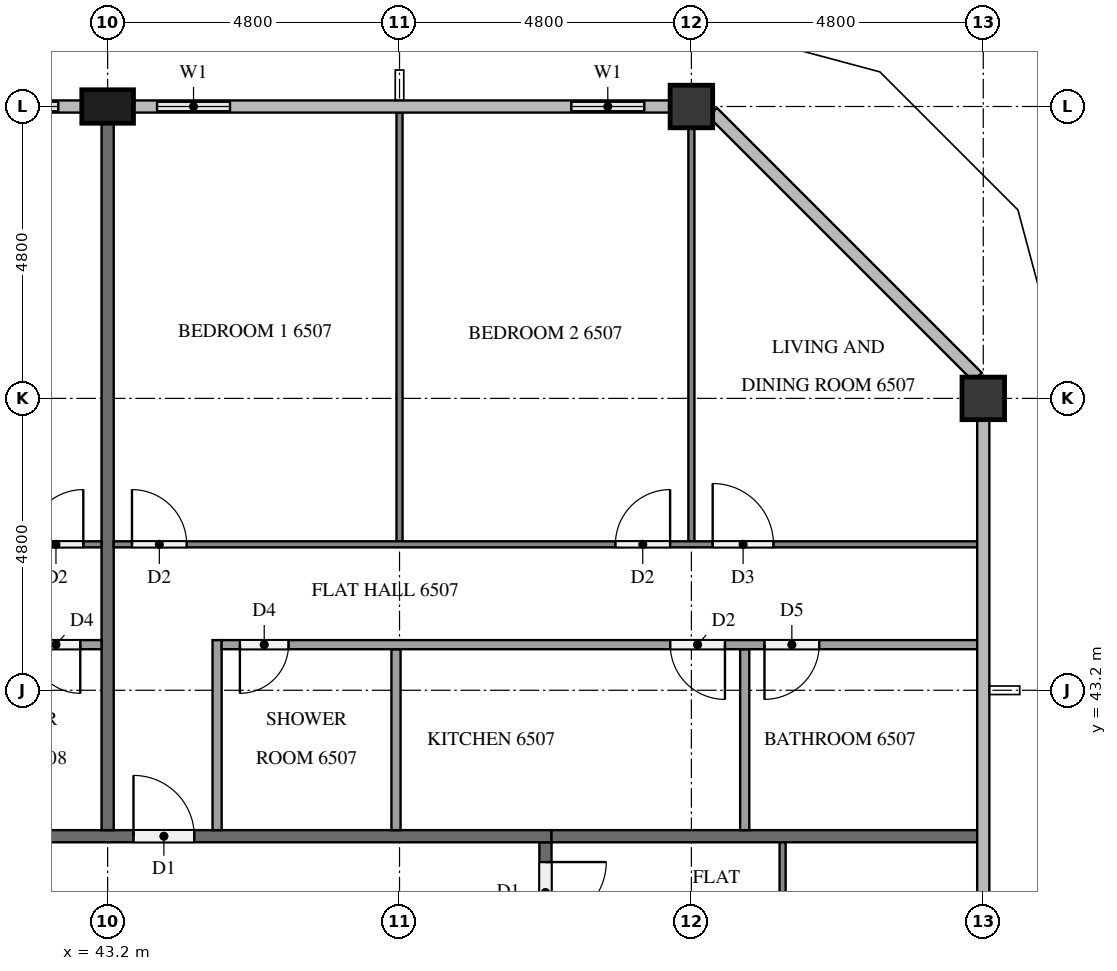
"""IFC4 building model, lengths in metres.
Left out: names, types, materials, properties, quantities, classifications, styles, units other than length and angle.
Written with IfcOpenShell. Run it as: python <this file> out.ifc"""

import sys

from ifc_helpers import new_model, si_unit, direction, frame, frame_2d, origin, origin_2d, place, context, subcontext, project, spatial, rectangle, extrude, element, fill, save


model = new_model("IFC4")
c1 = context("Model", 3, precision=1e-05, world=origin(), true_north=direction((0.0, 1.0)))
c2 = subcontext(c1, "Body", "Model", "MODEL_VIEW")
j1 = project(units=[si_unit("LENGTHUNIT", "METRE"), si_unit("PLANEANGLEUNIT", "RADIAN")], contexts=[c1])
p1 = place(None, origin())
s1 = spatial("IfcSite", under=j1, at=p1, CompositionType="ELEMENT")
p2 = place(p1, origin())
s2 = spatial("IfcBuilding", under=s1, at=p2, CompositionType="ELEMENT")
p3 = place(p2, frame((0.0, 0.0, 249.2)))
s3 = spatial("IfcBuildingStorey", under=s2, at=p3, CompositionType="ELEMENT", Elevation=249.2)
for number, where, z_axis, x_axis in (
    (1, (57.6, 48.0, 0.0), (0.0, 0.0, 1.0), (1.0, 0.0, 0.0)),
    (2, (52.8, 52.8, 0.0), (0.0, 0.0, 1.0), (1.0, 0.0, 0.0)),
):
    element("IfcColumn", number, at=place(p3, frame(where, z_axis=z_axis, x_axis=x_axis)), inside=s3, PredefinedType="COLUMN", context=c2, shape_type="SweptSolid", body=[
        extrude(rectangle(XDim=0.7, YDim=0.7, at=origin_2d()), origin(), (0.0, 0.0, 1.0), 3.2),
    ])
p4 = place(p3, frame((43.2, 52.8, 0.0), z_axis=(0.0, 0.0, 1.0), x_axis=(1.0, 0.0, 0.0)))
e3 = element("IfcColumn", 3, at=p4, inside=s3, PredefinedType="COLUMN", context=c2, shape_type="SweptSolid", body=[
    extrude(rectangle(XDim=0.85, YDim=0.55, at=origin_2d()), origin(), (0.0, 0.0, 1.0), 3.2),
])
p5 = place(p3, frame((52.45, 52.8, 0.0), z_axis=(0.0, 0.0, 1.0), x_axis=(-1.0, 0.0, 0.0)))
e4 = element("IfcWall", 4, at=p5, inside=s3, PredefinedType="SOLIDWALL", context=c2, shape_type="SweptSolid", body=[
    extrude(rectangle(XDim=2.05, YDim=0.15, at=frame_2d((1.025, 0.0))), origin(), (0.0, 0.0, 1.0), 3.2),
])
p6 = place(p5, frame((0.425, 0.0, 0.9)))
e5 = element("IfcOpeningElement", 5, at=p6, cuts=e4, PredefinedType="OPENING", context=c2, shape_type="SweptSolid", body=[
    extrude(rectangle(XDim=1.2, YDim=1.4, at=frame_2d((0.6, 0.7))), frame((0.0, 0.085, 0.0), z_axis=(0.0, -1.0, 0.0), x_axis=(1.0, 0.0, 0.0)), (0.0, 0.0, 1.0), 0.17),
])
p7 = place(p3, frame((45.6, 52.8, 0.0), z_axis=(0.0, 0.0, 1.0), x_axis=(-1.0, 0.0, 0.0)))
e6 = element("IfcWall", 6, at=p7, inside=s3, PredefinedType="SOLIDWALL", context=c2, shape_type="SweptSolid", body=[
    extrude(rectangle(XDim=1.975, YDim=0.15, at=frame_2d((0.988, 0.0))), origin(), (0.0, 0.0, 1.0), 3.2),
])
p8 = place(p7, frame((0.387, 0.0, 0.9)))
e7 = element("IfcOpeningElement", 7, at=p8, cuts=e6, PredefinedType="OPENING", context=c2, shape_type="SweptSolid", body=[
    extrude(rectangle(XDim=1.2, YDim=1.4, at=frame_2d((0.6, 0.7))), frame((0.0, 0.085, 0.0), z_axis=(0.0, -1.0, 0.0), x_axis=(1.0, 0.0, 0.0)), (0.0, 0.0, 1.0), 0.17),
])
p9 = place(p3, frame((42.775, 52.8, 0.0), z_axis=(0.0, 0.0, 1.0), x_axis=(-1.0, 0.0, 0.0)))
e8 = element("IfcWall", 8, at=p9, inside=s3, PredefinedType="SOLIDWALL", context=c2, shape_type="SweptSolid", body=[
    extrude(rectangle(XDim=1.975, YDim=0.15, at=frame_2d((0.987, 0.0))), origin(), (0.0, 0.0, 1.0), 3.2),
])
p10 = place(p9, frame((0.387, 0.0, 0.9)))
e9 = element("IfcOpeningElement", 9, at=p10, cuts=e8, PredefinedType="OPENING", context=c2, shape_type="SweptSolid", body=[
    extrude(rectangle(XDim=1.2, YDim=1.4, at=frame_2d((0.6, 0.7))), frame((0.0, 0.085, 0.0), z_axis=(0.0, -1.0, 0.0), x_axis=(1.0, 0.0, 0.0)), (0.0, 0.0, 1.0), 0.17),
])
p11 = place(p3, frame((50.4, 40.7, 0.0), z_axis=(0.0, 0.0, 1.0), x_axis=(0.0, -1.0, 0.0)))
e10 = element("IfcWall", 10, at=p11, inside=s3, PredefinedType="PARTITIONING", context=c2, shape_type="SweptSolid", body=[
    extrude(rectangle(XDim=28.6, YDim=0.2, at=frame_2d((14.3, 0.0))), origin(), (0.0, 0.0, 1.0), 3.2),
])
p12 = place(p11, frame((19.525, 0.0, 0.0)))
e11 = element("IfcOpeningElement", 11, at=p12, cuts=e10, PredefinedType="OPENING", context=c2, shape_type="SweptSolid", body=[
    extrude(rectangle(XDim=1.0, YDim=2.1, at=frame_2d((0.5, 1.05))), frame((0.0, 0.11, 0.0), z_axis=(0.0, -1.0, 0.0), x_axis=(1.0, 0.0, 0.0)), (0.0, 0.0, 1.0), 0.22),
])
p13 = place(p11, frame((17.675, 0.0, 0.0)))
e12 = element("IfcOpeningElement", 12, at=p13, cuts=e10, PredefinedType="OPENING", context=c2, shape_type="SweptSolid", body=[
    extrude(rectangle(XDim=1.0, YDim=2.1, at=frame_2d((0.5, 1.05))), frame((0.0, 0.11, 0.0), z_axis=(0.0, -1.0, 0.0), x_axis=(1.0, 0.0, 0.0)), (0.0, 0.0, 1.0), 0.22),
])
p14 = place(p11, frame((0.325, 0.0, 0.0)))
e13 = element("IfcOpeningElement", 13, at=p14, cuts=e10, PredefinedType="OPENING", context=c2, shape_type="SweptSolid", body=[
    extrude(rectangle(XDim=1.0, YDim=2.1, at=frame_2d((0.5, 1.05))), frame((0.0, 0.11, 0.0), z_axis=(0.0, -1.0, 0.0), x_axis=(1.0, 0.0, 0.0)), (0.0, 0.0, 1.0), 0.22),
])
p15 = place(p3, frame((11.9, 40.8, 0.0), z_axis=(0.0, 0.0, 1.0), x_axis=(1.0, 0.0, 0.0)))
e14 = element("IfcWall", 14, at=p15, inside=s3, PredefinedType="PARTITIONING", context=c2, shape_type="SweptSolid", body=[
    extrude(rectangle(XDim=38.6, YDim=0.2, at=frame_2d((19.3, 0.0))), origin(), (0.0, 0.0, 1.0), 3.2),
])
p16 = place(p15, frame((31.725, 0.0, 0.0)))
e15 = element("IfcOpeningElement", 15, at=p16, cuts=e14, PredefinedType="OPENING", context=c2, shape_type="SweptSolid", body=[
    extrude(rectangle(XDim=1.0, YDim=2.1, at=frame_2d((0.5, 1.05))), frame((0.0, 0.11, 0.0), z_axis=(0.0, -1.0, 0.0), x_axis=(1.0, 0.0, 0.0)), (0.0, 0.0, 1.0), 0.22),
])
p17 = place(p15, frame((17.325, 0.0, 0.0)))
e16 = element("IfcOpeningElement", 16, at=p17, cuts=e14, PredefinedType="OPENING", context=c2, shape_type="SweptSolid", body=[
    extrude(rectangle(XDim=1.0, YDim=2.1, at=frame_2d((0.5, 1.05))), frame((0.0, 0.11, 0.0), z_axis=(0.0, -1.0, 0.0), x_axis=(1.0, 0.0, 0.0)), (0.0, 0.0, 1.0), 0.22),
])
p18 = place(p15, frame((0.525, 0.0, 0.0)))
e17 = element("IfcOpeningElement", 17, at=p18, cuts=e14, PredefinedType="OPENING", context=c2, shape_type="SweptSolid", body=[
    extrude(rectangle(XDim=1.0, YDim=2.1, at=frame_2d((0.5, 1.05))), frame((0.0, 0.11, 0.0), z_axis=(0.0, -1.0, 0.0), x_axis=(1.0, 0.0, 0.0)), (0.0, 0.0, 1.0), 0.22),
])
p19 = place(p3, frame((50.5, 40.8, 0.0), z_axis=(0.0, 0.0, 1.0), x_axis=(1.0, 0.0, 0.0)))
e18 = element("IfcWall", 18, at=p19, inside=s3, PredefinedType="PARTITIONING", context=c2, shape_type="SweptSolid", body=[
    extrude(rectangle(XDim=7.0, YDim=0.2, at=frame_2d((3.5, 0.0))), origin(), (0.0, 0.0, 1.0), 3.2),
])
p20 = place(p3, frame((43.2, 52.525, 0.0), z_axis=(0.0, 0.0, 1.0), x_axis=(0.0, -1.0, 0.0)))
e19 = element("IfcWall", 19, at=p20, inside=s3, PredefinedType="PARTITIONING", context=c2, shape_type="SweptSolid", body=[
    extrude(rectangle(XDim=11.625, YDim=0.2, at=frame_2d((5.812, 0.0))), origin(), (0.0, 0.0, 1.0), 3.2),
])
p21 = place(p3, frame((54.3, 40.7, 0.0), z_axis=(0.0, 0.0, 1.0), x_axis=(0.0, -1.0, 0.0)))
e20 = element("IfcWall", 20, at=p21, inside=s3, PredefinedType="PARTITIONING", context=c2, shape_type="SweptSolid", body=[
    extrude(rectangle(XDim=9.4, YDim=0.1, at=frame_2d((4.7, 0.0))), origin(), (0.0, 0.0, 1.0), 3.2),
])
p22 = place(p21, frame((3.45, 0.0, 0.0)))
e21 = element("IfcOpeningElement", 21, at=p22, cuts=e20, PredefinedType="OPENING", context=c2, shape_type="SweptSolid", body=[
    extrude(rectangle(XDim=0.9, YDim=2.1, at=frame_2d((0.45, 1.05))), frame((0.0, 0.06, 0.0), z_axis=(0.0, -1.0, 0.0), x_axis=(1.0, 0.0, 0.0)), (0.0, 0.0, 1.0), 0.12),
])
p23 = place(p21, frame((5.05, 0.0, 0.0)))
e22 = element("IfcOpeningElement", 22, at=p23, cuts=e20, PredefinedType="OPENING", context=c2, shape_type="SweptSolid", body=[
    extrude(rectangle(XDim=1.0, YDim=2.1, at=frame_2d((0.5, 1.05))), frame((0.0, 0.06, 0.0), z_axis=(0.0, -1.0, 0.0), x_axis=(1.0, 0.0, 0.0)), (0.0, 0.0, 1.0), 0.12),
])
p24 = place(p3, frame((48.0, 45.65, 0.0), z_axis=(0.0, 0.0, 1.0), x_axis=(0.0, 1.0, 0.0)))
e23 = element("IfcWall", 23, at=p24, inside=s3, PredefinedType="PARTITIONING", context=c2, shape_type="SweptSolid", body=[
    extrude(rectangle(XDim=7.05, YDim=0.1, at=frame_2d((3.525, 0.0))), origin(), (0.0, 0.0, 1.0), 3.2),
])
p25 = place(p3, frame((52.8, 45.65, 0.0), z_axis=(0.0, 0.0, 1.0), x_axis=(0.0, 1.0, 0.0)))
e24 = element("IfcWall", 24, at=p25, inside=s3, PredefinedType="PARTITIONING", context=c2, shape_type="SweptSolid", body=[
    extrude(rectangle(XDim=6.8, YDim=0.1, at=frame_2d((3.4, 0.0))), origin(), (0.0, 0.0, 1.0), 3.2),
])
p26 = place(p3, frame((43.3, 45.6, 0.0), z_axis=(0.0, 0.0, 1.0), x_axis=(1.0, 0.0, 0.0)))
e25 = element("IfcWall", 25, at=p26, inside=s3, PredefinedType="PARTITIONING", context=c2, shape_type="SweptSolid", body=[
    extrude(rectangle(XDim=14.2, YDim=0.1, at=frame_2d((7.1, 0.0))), origin(), (0.0, 0.0, 1.0), 3.2),
])
p27 = place(p26, frame((0.3, 0.0, 0.0)))
e26 = element("IfcOpeningElement", 26, at=p27, cuts=e25, PredefinedType="OPENING", context=c2, shape_type="SweptSolid", body=[
    extrude(rectangle(XDim=0.9, YDim=2.1, at=frame_2d((0.45, 1.05))), frame((0.0, 0.06, 0.0), z_axis=(0.0, -1.0, 0.0), x_axis=(1.0, 0.0, 0.0)), (0.0, 0.0, 1.0), 0.12),
])
p28 = place(p26, frame((8.25, 0.0, 0.0)))
e27 = element("IfcOpeningElement", 27, at=p28, cuts=e25, PredefinedType="OPENING", context=c2, shape_type="SweptSolid", body=[
    extrude(rectangle(XDim=0.9, YDim=2.1, at=frame_2d((0.45, 1.05))), frame((0.0, 0.06, 0.0), z_axis=(0.0, -1.0, 0.0), x_axis=(1.0, 0.0, 0.0)), (0.0, 0.0, 1.0), 0.12),
])
p29 = place(p26, frame((9.85, 0.0, 0.0)))
e28 = element("IfcOpeningElement", 28, at=p29, cuts=e25, PredefinedType="OPENING", context=c2, shape_type="SweptSolid", body=[
    extrude(rectangle(XDim=1.0, YDim=2.1, at=frame_2d((0.5, 1.05))), frame((0.0, 0.06, 0.0), z_axis=(0.0, -1.0, 0.0), x_axis=(1.0, 0.0, 0.0)), (0.0, 0.0, 1.0), 0.12),
])
for number, where, z_axis, x_axis in (
    (29, (47.942, 40.9, 0.0), (0.0, 0.0, 1.0), (0.0, 1.0, 0.0)),
    (30, (53.677, 40.9, 0.0), (0.0, 0.0, 1.0), (0.0, 1.0, 0.0)),
):
    element("IfcWall", number, at=place(p3, frame(where, z_axis=z_axis, x_axis=x_axis)), inside=s3, PredefinedType="PARTITIONING", context=c2, shape_type="SweptSolid", body=[
        extrude(rectangle(XDim=2.975, YDim=0.15, at=frame_2d((1.488, 0.0))), origin(), (0.0, 0.0, 1.0), 3.2),
    ])
p30 = place(p3, frame((45.0, 40.9, 0.0), z_axis=(0.0, 0.0, 1.0), x_axis=(0.0, 1.0, 0.0)))
e31 = element("IfcWall", 31, at=p30, inside=s3, PredefinedType="PARTITIONING", context=c2, shape_type="SweptSolid", body=[
    extrude(rectangle(XDim=3.125, YDim=0.15, at=frame_2d((1.562, 0.0))), origin(), (0.0, 0.0, 1.0), 3.2),
])
p31 = place(p3, frame((57.5, 43.95, 0.0), z_axis=(0.0, 0.0, 1.0), x_axis=(-1.0, 0.0, 0.0)))
e32 = element("IfcWall", 32, at=p31, inside=s3, PredefinedType="PARTITIONING", context=c2, shape_type="SweptSolid", body=[
    extrude(rectangle(XDim=12.425, YDim=0.15, at=frame_2d((6.212, 0.0))), origin(), (0.0, 0.0, 1.0), 3.2),
])
p32 = place(p31, frame((11.325, 0.0, 0.0)))
e33 = element("IfcOpeningElement", 33, at=p32, cuts=e32, PredefinedType="OPENING", context=c2, shape_type="SweptSolid", body=[
    extrude(rectangle(XDim=0.8, YDim=2.1, at=frame_2d((0.4, 1.05))), frame((0.0, 0.085, 0.0), z_axis=(0.0, -1.0, 0.0), x_axis=(1.0, 0.0, 0.0)), (0.0, 0.0, 1.0), 0.17),
])
p33 = place(p31, frame((4.148, 0.0, 0.0)))
e34 = element("IfcOpeningElement", 34, at=p33, cuts=e32, PredefinedType="OPENING", context=c2, shape_type="SweptSolid", body=[
    extrude(rectangle(XDim=0.9, YDim=2.1, at=frame_2d((0.45, 1.05))), frame((0.0, 0.085, 0.0), z_axis=(0.0, -1.0, 0.0), x_axis=(1.0, 0.0, 0.0)), (0.0, 0.0, 1.0), 0.17),
])
p34 = place(p31, frame((2.598, 0.0, 0.0)))
e35 = element("IfcOpeningElement", 35, at=p34, cuts=e32, PredefinedType="OPENING", context=c2, shape_type="SweptSolid", body=[
    extrude(rectangle(XDim=0.9, YDim=2.1, at=frame_2d((0.45, 1.05))), frame((0.0, 0.085, 0.0), z_axis=(0.0, -1.0, 0.0), x_axis=(1.0, 0.0, 0.0)), (0.0, 0.0, 1.0), 0.17),
])
p35 = place(p3, frame((28.9, 45.6, 0.0), z_axis=(0.0, 0.0, 1.0), x_axis=(1.0, 0.0, 0.0)))
e36 = element("IfcWall", 36, at=p35, inside=s3, PredefinedType="PARTITIONING", context=c2, shape_type="SweptSolid", body=[
    extrude(rectangle(XDim=14.2, YDim=0.1, at=frame_2d((7.1, 0.0))), origin(), (0.0, 0.0, 1.0), 3.2),
])
p36 = place(p35, frame((3.35, 0.0, 0.0)))
e37 = element("IfcOpeningElement", 37, at=p36, cuts=e36, PredefinedType="OPENING", context=c2, shape_type="SweptSolid", body=[
    extrude(rectangle(XDim=1.0, YDim=2.1, at=frame_2d((0.5, 1.05))), frame((0.0, 0.06, 0.0), z_axis=(0.0, -1.0, 0.0), x_axis=(1.0, 0.0, 0.0)), (0.0, 0.0, 1.0), 0.12),
])
p37 = place(p35, frame((5.05, 0.0, 0.0)))
e38 = element("IfcOpeningElement", 38, at=p37, cuts=e36, PredefinedType="OPENING", context=c2, shape_type="SweptSolid", body=[
    extrude(rectangle(XDim=0.9, YDim=2.1, at=frame_2d((0.45, 1.05))), frame((0.0, 0.06, 0.0), z_axis=(0.0, -1.0, 0.0), x_axis=(1.0, 0.0, 0.0)), (0.0, 0.0, 1.0), 0.12),
])
p38 = place(p35, frame((13.0, 0.0, 0.0)))
e39 = element("IfcOpeningElement", 39, at=p38, cuts=e36, PredefinedType="OPENING", context=c2, shape_type="SweptSolid", body=[
    extrude(rectangle(XDim=0.9, YDim=2.1, at=frame_2d((0.45, 1.05))), frame((0.0, 0.06, 0.0), z_axis=(0.0, -1.0, 0.0), x_axis=(1.0, 0.0, 0.0)), (0.0, 0.0, 1.0), 0.12),
])
p39 = place(p3, frame((43.1, 43.95, 0.0), z_axis=(0.0, 0.0, 1.0), x_axis=(-1.0, 0.0, 0.0)))
e40 = element("IfcWall", 40, at=p39, inside=s3, PredefinedType="PARTITIONING", context=c2, shape_type="SweptSolid", body=[
    extrude(rectangle(XDim=12.425, YDim=0.15, at=frame_2d((6.212, 0.0))), origin(), (0.0, 0.0, 1.0), 3.2),
])
p40 = place(p39, frame((7.015, 0.0, 0.0)))
e41 = element("IfcOpeningElement", 41, at=p40, cuts=e40, PredefinedType="OPENING", context=c2, shape_type="SweptSolid", body=[
    extrude(rectangle(XDim=0.9, YDim=2.1, at=frame_2d((0.45, 1.05))), frame((0.0, 0.085, 0.0), z_axis=(0.0, -1.0, 0.0), x_axis=(1.0, 0.0, 0.0)), (0.0, 0.0, 1.0), 0.17),
])
p41 = place(p39, frame((5.465, 0.0, 0.0)))
e42 = element("IfcOpeningElement", 42, at=p41, cuts=e40, PredefinedType="OPENING", context=c2, shape_type="SweptSolid", body=[
    extrude(rectangle(XDim=0.9, YDim=2.1, at=frame_2d((0.45, 1.05))), frame((0.0, 0.085, 0.0), z_axis=(0.0, -1.0, 0.0), x_axis=(1.0, 0.0, 0.0)), (0.0, 0.0, 1.0), 0.17),
])
p42 = place(p39, frame((0.35, 0.0, 0.0)))
e43 = element("IfcOpeningElement", 43, at=p42, cuts=e40, PredefinedType="OPENING", context=c2, shape_type="SweptSolid", body=[
    extrude(rectangle(XDim=0.8, YDim=2.1, at=frame_2d((0.4, 1.05))), frame((0.0, 0.085, 0.0), z_axis=(0.0, -1.0, 0.0), x_axis=(1.0, 0.0, 0.0)), (0.0, 0.0, 1.0), 0.17),
])
p43 = place(p6, origin())
e44 = element("IfcWindow", 44, at=p43, inside=s3, PartitioningType="SINGLE_PANEL", PredefinedType="WINDOW", context=c2, shape_type="SweptSolid", body=[
    extrude(rectangle(XDim=1.2, YDim=1.4, at=frame_2d((0.6, 0.7))), frame((0.0, 0.03, 0.0), z_axis=(0.0, -1.0, 0.0), x_axis=(1.0, 0.0, 0.0)), (0.0, 0.0, 1.0), 0.06),
])
fill(e5, e44)
p44 = place(p8, origin())
e45 = element("IfcWindow", 45, at=p44, inside=s3, PartitioningType="SINGLE_PANEL", PredefinedType="WINDOW", context=c2, shape_type="SweptSolid", body=[
    extrude(rectangle(XDim=1.2, YDim=1.4, at=frame_2d((0.6, 0.7))), frame((0.0, 0.03, 0.0), z_axis=(0.0, -1.0, 0.0), x_axis=(1.0, 0.0, 0.0)), (0.0, 0.0, 1.0), 0.06),
])
fill(e7, e45)
p45 = place(p10, origin())
e46 = element("IfcWindow", 46, at=p45, inside=s3, PartitioningType="SINGLE_PANEL", PredefinedType="WINDOW", context=c2, shape_type="SweptSolid", body=[
    extrude(rectangle(XDim=1.2, YDim=1.4, at=frame_2d((0.6, 0.7))), frame((0.0, 0.03, 0.0), z_axis=(0.0, -1.0, 0.0), x_axis=(1.0, 0.0, 0.0)), (0.0, 0.0, 1.0), 0.06),
])
fill(e9, e46)
p46 = place(p14, origin())
e47 = element("IfcDoor", 47, at=p46, inside=s3, OperationType="SINGLE_SWING_LEFT", PredefinedType="DOOR", context=c2, shape_type="SweptSolid", body=[
    extrude(rectangle(XDim=1.0, YDim=2.1, at=frame_2d((0.5, 1.05))), frame((0.0, 0.025, 0.0), z_axis=(0.0, -1.0, 0.0), x_axis=(1.0, 0.0, 0.0)), (0.0, 0.0, 1.0), 0.05),
])
fill(e13, e47)
p47 = place(p16, origin())
e48 = element("IfcDoor", 48, at=p47, inside=s3, OperationType="SINGLE_SWING_LEFT", PredefinedType="DOOR", context=c2, shape_type="SweptSolid", body=[
    extrude(rectangle(XDim=1.0, YDim=2.1, at=frame_2d((0.5, 1.05))), frame((0.0, 0.025, 0.0), z_axis=(0.0, -1.0, 0.0), x_axis=(1.0, 0.0, 0.0)), (0.0, 0.0, 1.0), 0.05),
])
fill(e15, e48)
p48 = place(p27, origin())
e49 = element("IfcDoor", 49, at=p48, inside=s3, OperationType="SINGLE_SWING_LEFT", PredefinedType="DOOR", context=c2, shape_type="SweptSolid", body=[
    extrude(rectangle(XDim=0.9, YDim=2.1, at=frame_2d((0.45, 1.05))), frame((0.0, 0.025, 0.0), z_axis=(0.0, -1.0, 0.0), x_axis=(1.0, 0.0, 0.0)), (0.0, 0.0, 1.0), 0.05),
])
fill(e26, e49)
p49 = place(p28, origin())
e50 = element("IfcDoor", 50, at=p49, inside=s3, OperationType="SINGLE_SWING_RIGHT", PredefinedType="DOOR", context=c2, shape_type="SweptSolid", body=[
    extrude(rectangle(XDim=0.9, YDim=2.1, at=frame_2d((0.45, 1.05))), frame((0.0, 0.025, 0.0), z_axis=(0.0, -1.0, 0.0), x_axis=(1.0, 0.0, 0.0)), (0.0, 0.0, 1.0), 0.05),
])
fill(e27, e50)
p50 = place(p29, origin())
e51 = element("IfcDoor", 51, at=p50, inside=s3, OperationType="SINGLE_SWING_LEFT", PredefinedType="DOOR", context=c2, shape_type="SweptSolid", body=[
    extrude(rectangle(XDim=1.0, YDim=2.1, at=frame_2d((0.5, 1.05))), frame((0.0, 0.025, 0.0), z_axis=(0.0, -1.0, 0.0), x_axis=(1.0, 0.0, 0.0)), (0.0, 0.0, 1.0), 0.05),
])
fill(e28, e51)
p51 = place(p32, origin())
e52 = element("IfcDoor", 52, at=p51, inside=s3, OperationType="SINGLE_SWING_RIGHT", PredefinedType="DOOR", context=c2, shape_type="SweptSolid", body=[
    extrude(rectangle(XDim=0.8, YDim=2.1, at=frame_2d((0.4, 1.05))), frame((0.0, 0.025, 0.0), z_axis=(0.0, -1.0, 0.0), x_axis=(1.0, 0.0, 0.0)), (0.0, 0.0, 1.0), 0.05),
])
fill(e33, e52)
p52 = place(p33, origin())
e53 = element("IfcDoor", 53, at=p52, inside=s3, OperationType="SINGLE_SWING_LEFT", PredefinedType="DOOR", context=c2, shape_type="SweptSolid", body=[
    extrude(rectangle(XDim=0.9, YDim=2.1, at=frame_2d((0.45, 1.05))), frame((0.0, 0.025, 0.0), z_axis=(0.0, -1.0, 0.0), x_axis=(1.0, 0.0, 0.0)), (0.0, 0.0, 1.0), 0.05),
])
fill(e34, e53)
p53 = place(p34, origin())
e54 = element("IfcDoor", 54, at=p53, inside=s3, OperationType="SINGLE_SWING_RIGHT", PredefinedType="DOOR", context=c2, shape_type="SweptSolid", body=[
    extrude(rectangle(XDim=0.9, YDim=2.1, at=frame_2d((0.45, 1.05))), frame((0.0, 0.025, 0.0), z_axis=(0.0, -1.0, 0.0), x_axis=(1.0, 0.0, 0.0)), (0.0, 0.0, 1.0), 0.05),
])
fill(e35, e54)
p54 = place(p38, origin())
e55 = element("IfcDoor", 55, at=p54, inside=s3, OperationType="SINGLE_SWING_RIGHT", PredefinedType="DOOR", context=c2, shape_type="SweptSolid", body=[
    extrude(rectangle(XDim=0.9, YDim=2.1, at=frame_2d((0.45, 1.05))), frame((0.0, 0.025, 0.0), z_axis=(0.0, -1.0, 0.0), x_axis=(1.0, 0.0, 0.0)), (0.0, 0.0, 1.0), 0.05),
])
fill(e39, e55)
p55 = place(p42, origin())
e56 = element("IfcDoor", 56, at=p55, inside=s3, OperationType="SINGLE_SWING_LEFT", PredefinedType="DOOR", context=c2, shape_type="SweptSolid", body=[
    extrude(rectangle(XDim=0.8, YDim=2.1, at=frame_2d((0.4, 1.05))), frame((0.0, 0.025, 0.0), z_axis=(0.0, -1.0, 0.0), x_axis=(1.0, 0.0, 0.0)), (0.0, 0.0, 1.0), 0.05),
])
fill(e43, e56)
save(model, sys.argv[1])
